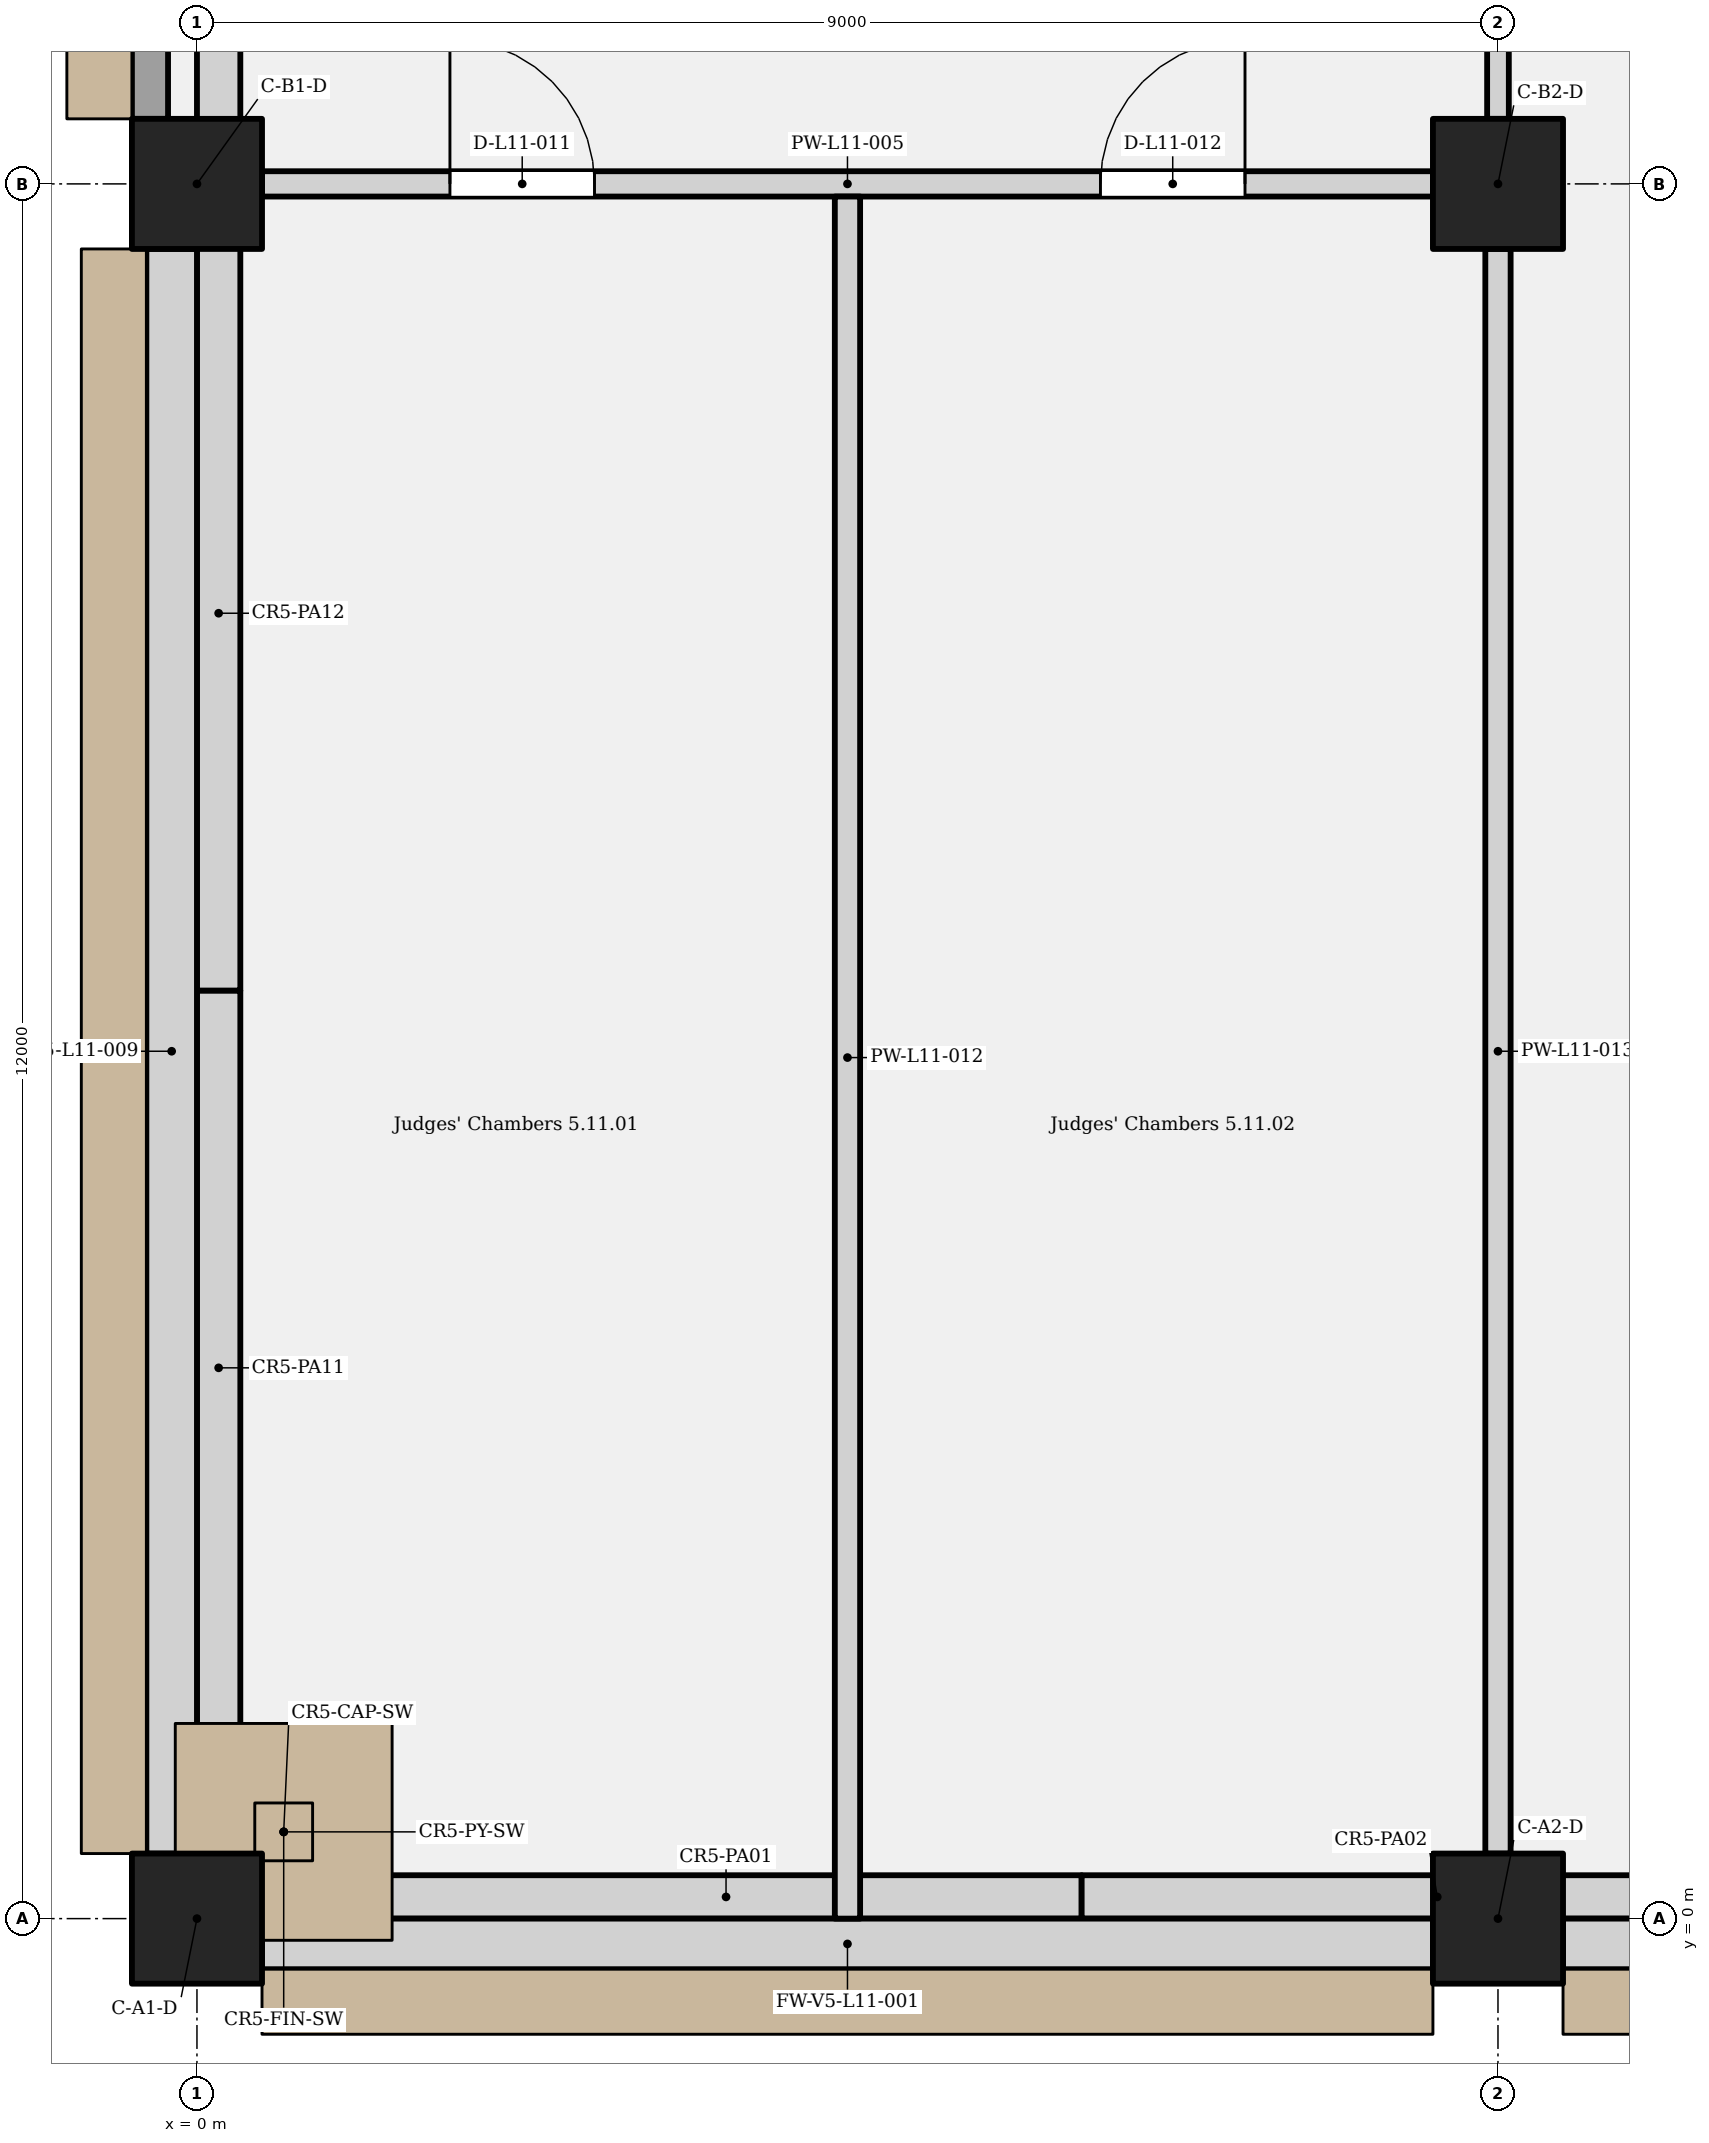
"""IFC4 building model, lengths in metres.
Left out: names, types, materials, properties, quantities, classifications, styles, units other than length and angle.
Written with IfcOpenShell. Run it as: python <this file> out.ifc"""

import sys

from ifc_helpers import new_model, si_unit, direction, frame, frame_2d, origin, origin_2d, place, context, subcontext, project, spatial, rectangle, extrude, element, fill, save


model = new_model("IFC4")
c1 = context("Model", 3, precision=1e-05, world=origin(), true_north=direction((0.0, 1.0)))
c2 = subcontext(c1, "Body", "Model", "MODEL_VIEW")
j1 = project(units=[si_unit("LENGTHUNIT", "METRE"), si_unit("PLANEANGLEUNIT", "RADIAN")], contexts=[c1])
p1 = place(None, origin())
s1 = spatial("IfcSite", under=j1, at=p1, CompositionType="ELEMENT")
p2 = place(p1, origin())
s2 = spatial("IfcBuilding", under=s1, at=p2, CompositionType="ELEMENT")
p3 = place(p2, frame((0.0, 0.0, 57.9)))
s3 = spatial("IfcBuildingStorey", under=s2, at=p3, CompositionType="ELEMENT", Elevation=57.9)
for number, where, z_axis, x_axis in (
    (1, (0.0, 0.0, 0.0), (0.0, 0.0, 1.0), (1.0, 0.0, 0.0)),
    (2, (9.0, 0.0, 0.0), (0.0, 0.0, 1.0), (1.0, 0.0, 0.0)),
    (3, (0.0, 12.0, 0.0), (0.0, 0.0, 1.0), (1.0, 0.0, 0.0)),
    (4, (9.0, 12.0, 0.0), (0.0, 0.0, 1.0), (1.0, 0.0, 0.0)),
):
    element("IfcColumn", number, at=place(p3, frame(where, z_axis=z_axis, x_axis=x_axis)), inside=s3, PredefinedType="COLUMN", context=c2, shape_type="SweptSolid", body=[
        extrude(rectangle(XDim=0.9, YDim=0.9, at=origin_2d()), origin(), (0.0, 0.0, 1.0), 4.5),
    ])
for number, where, z_axis, x_axis in (
    (5, (0.45, -0.175, 0.0), (0.0, 0.0, 1.0), (1.0, 0.0, 0.0)),
    (6, (9.45, -0.175, 0.0), (0.0, 0.0, 1.0), (1.0, 0.0, 0.0)),
):
    element("IfcWall", number, at=place(p3, frame(where, z_axis=z_axis, x_axis=x_axis)), inside=s3, PredefinedType="SOLIDWALL", context=c2, shape_type="SweptSolid", body=[
        extrude(rectangle(XDim=8.1, YDim=0.35, at=frame_2d((4.05, 0.0))), origin(), (0.0, 0.0, 1.0), 4.25),
    ])
p4 = place(p3, frame((-0.175, 0.45, 0.0), z_axis=(0.0, 0.0, 1.0), x_axis=(0.0, 1.0, 0.0)))
e7 = element("IfcWall", 7, at=p4, inside=s3, PredefinedType="SOLIDWALL", context=c2, shape_type="SweptSolid", body=[
    extrude(rectangle(XDim=11.1, YDim=0.35, at=frame_2d((5.55, 0.0))), origin(), (0.0, 0.0, 1.0), 4.25),
])
p5 = place(p3, frame((-0.325, 12.45, 0.0), z_axis=(0.0, 0.0, 1.0), x_axis=(0.0, 1.0, 0.0)))
e8 = element("IfcWall", 8, at=p5, inside=s3, PredefinedType="SOLIDWALL", context=c2, shape_type="SweptSolid", body=[
    extrude(rectangle(XDim=15.6, YDim=0.25, at=frame_2d((7.8, 0.0))), origin(), (0.0, 0.0, 1.0), 4.25),
])
p6 = place(p3, frame((0.0, 0.6, 4.5), z_axis=(0.0, 0.0, 1.0), x_axis=(1.0, 0.0, 0.0)))
e9 = element("IfcWall", 9, at=p6, inside=s3, PredefinedType="SOLIDWALL", context=c2, shape_type="SweptSolid", body=[
    extrude(rectangle(XDim=1.2, YDim=1.2, at=frame_2d((0.6, 0.0))), origin(), (0.0, 0.0, 1.0), 3.6),
])
p7 = place(p3, frame((1.2, 0.15, 4.5), z_axis=(0.0, 0.0, 1.0), x_axis=(1.0, 0.0, 0.0)))
e10 = element("IfcWall", 10, at=p7, inside=s3, PredefinedType="PARAPET", context=c2, shape_type="SweptSolid", body=[
    extrude(rectangle(XDim=4.92, YDim=0.3, at=frame_2d((2.46, 0.0))), origin(), (0.0, 0.0, 1.0), 1.2),
])
p8 = place(p3, frame((6.12, 0.15, 4.5), z_axis=(0.0, 0.0, 1.0), x_axis=(1.0, 0.0, 0.0)))
e11 = element("IfcWall", 11, at=p8, inside=s3, PredefinedType="PARAPET", context=c2, shape_type="SweptSolid", body=[
    extrude(rectangle(XDim=4.92, YDim=0.3, at=frame_2d((2.46, 0.0))), origin(), (0.0, 0.0, 1.0), 1.6),
])
p9 = place(p3, frame((0.15, 1.2, 4.5), z_axis=(0.0, 0.0, 1.0), x_axis=(0.0, 1.0, 0.0)))
e12 = element("IfcWall", 12, at=p9, inside=s3, PredefinedType="PARAPET", context=c2, shape_type="SweptSolid", body=[
    extrude(rectangle(XDim=5.22, YDim=0.3, at=frame_2d((2.61, 0.0))), origin(), (0.0, 0.0, 1.0), 1.2),
])
p10 = place(p3, frame((0.15, 6.42, 4.5), z_axis=(0.0, 0.0, 1.0), x_axis=(0.0, 1.0, 0.0)))
e13 = element("IfcWall", 13, at=p10, inside=s3, PredefinedType="PARAPET", context=c2, shape_type="SweptSolid", body=[
    extrude(rectangle(XDim=5.22, YDim=0.3, at=frame_2d((2.61, 0.0))), origin(), (0.0, 0.0, 1.0), 1.6),
])
p11 = place(p3, frame((0.15, 11.64, 4.5), z_axis=(0.0, 0.0, 1.0), x_axis=(0.0, 1.0, 0.0)))
e14 = element("IfcWall", 14, at=p11, inside=s3, PredefinedType="PARAPET", context=c2, shape_type="SweptSolid", body=[
    extrude(rectangle(XDim=5.22, YDim=0.3, at=frame_2d((2.61, 0.0))), origin(), (0.0, 0.0, 1.0), 2.0),
])
p12 = place(p3, frame((0.45, 12.0, 0.0), z_axis=(0.0, 0.0, 1.0), x_axis=(1.0, 0.0, 0.0)))
e15 = element("IfcWall", 15, at=p12, inside=s3, PredefinedType="PARTITIONING", context=c2, shape_type="SweptSolid", body=[
    extrude(rectangle(XDim=8.1, YDim=0.175, at=frame_2d((4.05, 0.0))), origin(), (0.0, 0.0, 1.0), 3.5),
])
p13 = place(p12, frame((1.3, 0.0, 0.0)))
e16 = element("IfcOpeningElement", 16, at=p13, cuts=e15, PredefinedType="OPENING", context=c2, shape_type="SweptSolid", body=[
    extrude(rectangle(XDim=1.0, YDim=2.1, at=frame_2d((0.5, 1.05))), frame((0.0, 0.097, 0.0), z_axis=(0.0, -1.0, 0.0), x_axis=(1.0, 0.0, 0.0)), (0.0, 0.0, 1.0), 0.195),
])
p14 = place(p12, frame((5.8, 0.0, 0.0)))
e17 = element("IfcOpeningElement", 17, at=p14, cuts=e15, PredefinedType="OPENING", context=c2, shape_type="SweptSolid", body=[
    extrude(rectangle(XDim=1.0, YDim=2.1, at=frame_2d((0.5, 1.05))), frame((0.0, 0.097, 0.0), z_axis=(0.0, -1.0, 0.0), x_axis=(1.0, 0.0, 0.0)), (0.0, 0.0, 1.0), 0.195),
])
p15 = place(p3, frame((4.5, 0.0, 0.0), z_axis=(0.0, 0.0, 1.0), x_axis=(0.0, 1.0, 0.0)))
e18 = element("IfcWall", 18, at=p15, inside=s3, PredefinedType="PARTITIONING", context=c2, shape_type="SweptSolid", body=[
    extrude(rectangle(XDim=11.913, YDim=0.175, at=frame_2d((5.956, 0.0))), origin(), (0.0, 0.0, 1.0), 4.25),
])
p16 = place(p3, frame((9.0, 0.45, 0.0), z_axis=(0.0, 0.0, 1.0), x_axis=(0.0, 1.0, 0.0)))
e19 = element("IfcWall", 19, at=p16, inside=s3, PredefinedType="PARTITIONING", context=c2, shape_type="SweptSolid", body=[
    extrude(rectangle(XDim=11.1, YDim=0.175, at=frame_2d((5.55, 0.0))), origin(), (0.0, 0.0, 1.0), 3.5),
])
p17 = place(p3, frame((9.0, 12.45, 0.0), z_axis=(0.0, 0.0, 1.0), x_axis=(0.0, 1.0, 0.0)))
e20 = element("IfcWall", 20, at=p17, inside=s3, PredefinedType="PARTITIONING", context=c2, shape_type="SweptSolid", body=[
    extrude(rectangle(XDim=4.575, YDim=0.15, at=frame_2d((2.288, 0.0))), origin(), (0.0, 0.0, 1.0), 3.3),
])
p18 = place(p13, origin())
e21 = element("IfcDoor", 21, at=p18, inside=s3, OperationType="SINGLE_SWING_LEFT", PredefinedType="DOOR", context=c2, shape_type="SweptSolid", body=[
    extrude(rectangle(XDim=1.0, YDim=2.1, at=frame_2d((0.5, 1.05))), frame((0.0, 0.025, 0.0), z_axis=(0.0, -1.0, 0.0), x_axis=(1.0, 0.0, 0.0)), (0.0, 0.0, 1.0), 0.05),
])
fill(e16, e21)
p19 = place(p14, origin())
e22 = element("IfcDoor", 22, at=p19, inside=s3, OperationType="SINGLE_SWING_RIGHT", PredefinedType="DOOR", context=c2, shape_type="SweptSolid", body=[
    extrude(rectangle(XDim=1.0, YDim=2.1, at=frame_2d((0.5, 1.05))), frame((0.0, 0.025, 0.0), z_axis=(0.0, -1.0, 0.0), x_axis=(1.0, 0.0, 0.0)), (0.0, 0.0, 1.0), 0.05),
])
fill(e17, e22)
save(model, sys.argv[1])
